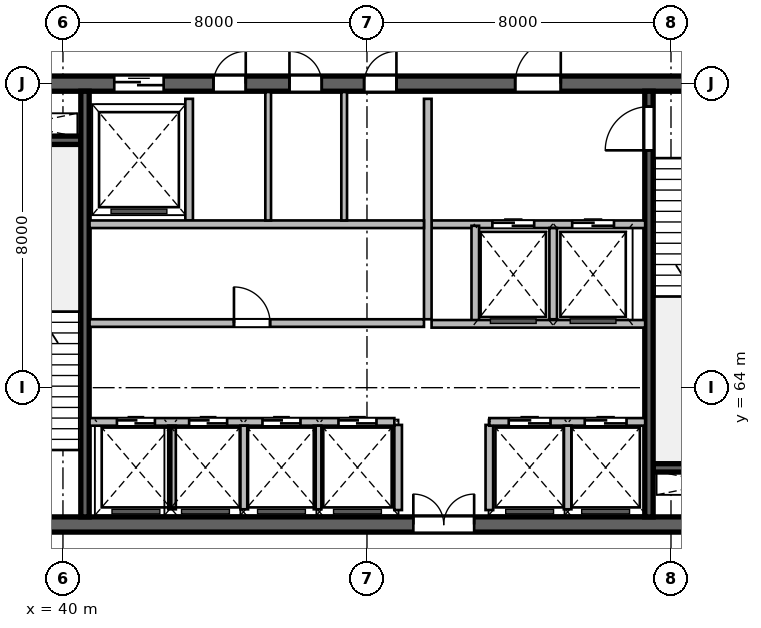
"""IFC4 building model, lengths in metres.
Left out: names, types, materials, properties, quantities, classifications, styles, units other than length and angle.
Written with IfcOpenShell. Run it as: python <this file> out.ifc"""

import sys

from ifc_helpers import new_model, si_unit, direction, frame, frame_2d, origin, place, context, subcontext, project, spatial, rectangle, extrude, source, transform, mapped, element, fill, save


model = new_model("IFC4")
c1 = context("Model", 3, precision=1e-05, world=origin(), true_north=direction((0.0, 1.0)))
c2 = subcontext(c1, "Body", "Model", "MODEL_VIEW")
j1 = project(units=[si_unit("LENGTHUNIT", "METRE"), si_unit("PLANEANGLEUNIT", "RADIAN")], contexts=[c1])
p1 = place(None, origin())
s1 = spatial("IfcSite", under=j1, at=p1, CompositionType="ELEMENT")
p2 = place(p1, origin())
s2 = spatial("IfcBuilding", under=s1, at=p2, CompositionType="ELEMENT")
p3 = place(p2, frame((0.0, 0.0, 303.0)))
s3 = spatial("IfcBuildingStorey", under=s2, at=p3, CompositionType="ELEMENT", Elevation=303.0)
m1 = source(origin(), c2, "Body", "SweptSolid", [
    extrude(rectangle(XDim=21.6, YDim=0.4, at=frame_2d((10.8, 0.0))), origin(), (0.0, 0.0, 1.0), 4.8),
])
p4 = place(p3, frame((37.2, 60.4, 0.0), z_axis=(0.0, 0.0, 1.0), x_axis=(1.0, 0.0, 0.0)))
e1 = element("IfcWall", 1, at=p4, inside=s3, PredefinedType="SHEAR", context=c2, shape_type="MappedRepresentation", body=[
    mapped(m1, transform((0.0, 0.0, 0.0), scale=1.0)),
])
p5 = place(p4, frame((1.1, 0.0, 0.0)))
e2 = element("IfcOpeningElement", 2, at=p5, cuts=e1, PredefinedType="OPENING", context=c2, shape_type="SweptSolid", body=[
    extrude(rectangle(XDim=1.15, YDim=2.15, at=frame_2d((0.575, 1.075))), frame((0.0, 0.21, 0.0), z_axis=(0.0, -1.0, 0.0), x_axis=(1.0, 0.0, 0.0)), (0.0, 0.0, 1.0), 0.42),
])
p6 = place(p4, frame((19.5, 0.0, 0.0)))
e3 = element("IfcOpeningElement", 3, at=p6, cuts=e1, PredefinedType="OPENING", context=c2, shape_type="SweptSolid", body=[
    extrude(rectangle(XDim=0.9, YDim=2.1, at=frame_2d((0.45, 1.05))), frame((0.0, 0.21, 0.0), z_axis=(0.0, -1.0, 0.0), x_axis=(1.0, 0.0, 0.0)), (0.0, 0.0, 1.0), 0.42),
])
p7 = place(p4, frame((12.02, 0.0, 0.0)))
e4 = element("IfcOpeningElement", 4, at=p7, cuts=e1, PredefinedType="OPENING", context=c2, shape_type="SweptSolid", body=[
    extrude(rectangle(XDim=1.6, YDim=2.15, at=frame_2d((0.8, 1.075))), frame((0.0, 0.21, 0.0), z_axis=(0.0, -1.0, 0.0), x_axis=(1.0, 0.0, 0.0)), (0.0, 0.0, 1.0), 0.42),
])
p8 = place(p3, frame((37.2, 72.0, 0.0), z_axis=(0.0, 0.0, 1.0), x_axis=(1.0, 0.0, 0.0)))
e5 = element("IfcWall", 5, at=p8, inside=s3, PredefinedType="SHEAR", context=c2, shape_type="MappedRepresentation", body=[
    mapped(m1, transform((0.0, 0.0, 0.0), scale=1.0)),
])
p9 = place(p8, frame((1.2, 0.0, 0.0)))
e6 = element("IfcOpeningElement", 6, at=p9, cuts=e5, PredefinedType="OPENING", context=c2, shape_type="SweptSolid", body=[
    extrude(rectangle(XDim=0.9, YDim=2.1, at=frame_2d((0.45, 1.05))), frame((0.0, 0.21, 0.0), z_axis=(0.0, -1.0, 0.0), x_axis=(1.0, 0.0, 0.0)), (0.0, 0.0, 1.0), 0.42),
])
p10 = place(p8, frame((14.7, 0.0, 0.0)))
e7 = element("IfcOpeningElement", 7, at=p10, cuts=e5, PredefinedType="OPENING", context=c2, shape_type="SweptSolid", body=[
    extrude(rectangle(XDim=1.2, YDim=2.15, at=frame_2d((0.6, 1.075))), frame((0.0, 0.21, 0.0), z_axis=(0.0, -1.0, 0.0), x_axis=(1.0, 0.0, 0.0)), (0.0, 0.0, 1.0), 0.42),
])
p11 = place(p8, frame((4.15, 0.0, 0.0)))
e8 = element("IfcOpeningElement", 8, at=p11, cuts=e5, PredefinedType="OPENING", context=c2, shape_type="SweptSolid", body=[
    extrude(rectangle(XDim=1.3, YDim=2.15, at=frame_2d((0.65, 1.075))), frame((0.0, 0.21, 0.0), z_axis=(0.0, -1.0, 0.0), x_axis=(1.0, 0.0, 0.0)), (0.0, 0.0, 1.0), 0.42),
])
p12 = place(p8, frame((6.76, 0.0, 0.0)))
e9 = element("IfcOpeningElement", 9, at=p12, cuts=e5, PredefinedType="OPENING", context=c2, shape_type="SweptSolid", body=[
    extrude(rectangle(XDim=0.85, YDim=2.1, at=frame_2d((0.425, 1.05))), frame((0.0, 0.21, 0.0), z_axis=(0.0, -1.0, 0.0), x_axis=(1.0, 0.0, 0.0)), (0.0, 0.0, 1.0), 0.42),
])
p13 = place(p8, frame((8.76, 0.0, 0.0)))
e10 = element("IfcOpeningElement", 10, at=p13, cuts=e5, PredefinedType="OPENING", context=c2, shape_type="SweptSolid", body=[
    extrude(rectangle(XDim=0.85, YDim=2.1, at=frame_2d((0.425, 1.05))), frame((0.0, 0.21, 0.0), z_axis=(0.0, -1.0, 0.0), x_axis=(1.0, 0.0, 0.0)), (0.0, 0.0, 1.0), 0.42),
])
p14 = place(p8, frame((10.725, 0.0, 0.0)))
e11 = element("IfcOpeningElement", 11, at=p14, cuts=e5, PredefinedType="OPENING", context=c2, shape_type="SweptSolid", body=[
    extrude(rectangle(XDim=0.85, YDim=2.1, at=frame_2d((0.425, 1.05))), frame((0.0, 0.21, 0.0), z_axis=(0.0, -1.0, 0.0), x_axis=(1.0, 0.0, 0.0)), (0.0, 0.0, 1.0), 0.42),
])
m2 = source(origin(), c2, "Body", "SweptSolid", [
    extrude(rectangle(XDim=3.27, YDim=0.22, at=frame_2d((1.635, 0.0))), origin(), (0.0, 0.0, 1.0), 4.8),
])
for number, where, z_axis, x_axis in (
    (12, (37.2, 70.51, 0.0), (0.0, 0.0, 1.0), (1.0, 0.0, 0.0)),
    (13, (55.53, 61.89, 0.0), (0.0, 0.0, 1.0), (1.0, 0.0, 0.0)),
):
    element("IfcWall", number, at=place(p3, frame(where, z_axis=z_axis, x_axis=x_axis)), inside=s3, PredefinedType="SHEAR", context=c2, shape_type="MappedRepresentation", body=[
        mapped(m2, transform((0.0, 0.0, 0.0), scale=1.0)),
    ])
m3 = source(origin(), c2, "Body", "SweptSolid", [
    extrude(rectangle(XDim=11.2, YDim=0.22, at=frame_2d((5.6, 0.0))), origin(), (0.0, 0.0, 1.0), 4.8),
])
p15 = place(p3, frame((40.58, 60.6, 0.0), z_axis=(0.0, 0.0, 1.0), x_axis=(0.0, 1.0, 0.0)))
e14 = element("IfcWall", 14, at=p15, inside=s3, PredefinedType="SHEAR", context=c2, shape_type="MappedRepresentation", body=[
    mapped(m3, transform((0.0, 0.0, 0.0), scale=1.0)),
])
p16 = place(p3, frame((55.42, 60.6, 0.0), z_axis=(0.0, 0.0, 1.0), x_axis=(0.0, 1.0, 0.0)))
e15 = element("IfcWall", 15, at=p16, inside=s3, PredefinedType="SHEAR", context=c2, shape_type="MappedRepresentation", body=[
    mapped(m3, transform((0.0, 0.0, 0.0), scale=1.0)),
])
p17 = place(p16, frame((9.645, 0.0, 0.0)))
e16 = element("IfcOpeningElement", 16, at=p17, cuts=e15, PredefinedType="OPENING", context=c2, shape_type="SweptSolid", body=[
    extrude(rectangle(XDim=1.15, YDim=2.15, at=frame_2d((0.575, 1.075))), frame((0.0, 0.12, 0.0), z_axis=(0.0, -1.0, 0.0), x_axis=(1.0, 0.0, 0.0)), (0.0, 0.0, 1.0), 0.24),
])
m4 = source(origin(), c2, "Body", "SweptSolid", [
    extrude(rectangle(XDim=2.24, YDim=0.2, at=frame_2d((1.12, 0.0))), origin(), (0.0, 0.0, 1.0), 4.54),
])
for number, where, z_axis, x_axis in (
    (17, (48.82, 60.78, 0.0), (0.0, 0.0, 1.0), (0.0, 1.0, 0.0)),
    (18, (51.22, 60.78, 0.0), (0.0, 0.0, 1.0), (0.0, 1.0, 0.0)),
):
    element("IfcWall", number, at=place(p3, frame(where, z_axis=z_axis, x_axis=x_axis)), inside=s3, PredefinedType="SOLIDWALL", context=c2, shape_type="MappedRepresentation", body=[
        mapped(m4, transform((0.0, 0.0, 0.0), scale=1.0)),
    ])
m5 = source(origin(), c2, "Body", "SweptSolid", [
    extrude(rectangle(XDim=5.62, YDim=0.2, at=frame_2d((2.81, 0.0))), origin(), (0.0, 0.0, 1.0), 4.54),
])
p18 = place(p3, frame((49.7, 68.3, 0.0), z_axis=(0.0, 0.0, 1.0), x_axis=(1.0, 0.0, 0.0)))
e19 = element("IfcWall", 19, at=p18, inside=s3, PredefinedType="SOLIDWALL", context=c2, shape_type="MappedRepresentation", body=[
    mapped(m5, transform((0.0, 0.0, 0.0), scale=1.0)),
])
p19 = place(p18, frame((1.6, 0.0, 0.0)))
e20 = element("IfcOpeningElement", 20, at=p19, cuts=e19, PredefinedType="OPENING", context=c2, shape_type="SweptSolid", body=[
    extrude(rectangle(XDim=1.1, YDim=2.15, at=frame_2d((0.55, 1.075))), frame((0.0, 0.11, 0.0), z_axis=(0.0, -1.0, 0.0), x_axis=(1.0, 0.0, 0.0)), (0.0, 0.0, 1.0), 0.22),
])
p20 = place(p18, frame((3.7, 0.0, 0.0)))
e21 = element("IfcOpeningElement", 21, at=p20, cuts=e19, PredefinedType="OPENING", context=c2, shape_type="SweptSolid", body=[
    extrude(rectangle(XDim=1.1, YDim=2.15, at=frame_2d((0.55, 1.075))), frame((0.0, 0.11, 0.0), z_axis=(0.0, -1.0, 0.0), x_axis=(1.0, 0.0, 0.0)), (0.0, 0.0, 1.0), 0.22),
])
m6 = source(origin(), c2, "Body", "SweptSolid", [
    extrude(rectangle(XDim=5.8, YDim=0.2, at=frame_2d((2.9, 0.0))), origin(), (0.0, 0.0, 1.0), 4.54),
])
p21 = place(p3, frame((49.6, 65.8, 0.0), z_axis=(0.0, 0.0, 1.0), x_axis=(0.0, 1.0, 0.0)))
e22 = element("IfcWall", 22, at=p21, inside=s3, PredefinedType="SOLIDWALL", context=c2, shape_type="MappedRepresentation", body=[
    mapped(m6, transform((0.0, 0.0, 0.0), scale=1.0)),
])
m7 = source(origin(), c2, "Body", "SweptSolid", [
    extrude(rectangle(XDim=2.58, YDim=0.2, at=frame_2d((1.29, 0.0))), origin(), (0.0, 0.0, 1.0), 4.54),
])
p22 = place(p3, frame((50.85, 65.68, 0.0), z_axis=(0.0, 0.0, 1.0), x_axis=(0.0, 1.0, 0.0)))
e23 = element("IfcWall", 23, at=p22, inside=s3, PredefinedType="SOLIDWALL", context=c2, shape_type="MappedRepresentation", body=[
    mapped(m7, transform((0.0, 0.0, 0.0), scale=1.0)),
])
m8 = source(origin(), c2, "Body", "SweptSolid", [
    extrude(rectangle(XDim=2.4, YDim=0.2, at=frame_2d((1.2, 0.0))), origin(), (0.0, 0.0, 1.0), 4.54),
])
p23 = place(p3, frame((52.9, 65.8, 0.0), z_axis=(0.0, 0.0, 1.0), x_axis=(0.0, 1.0, 0.0)))
e24 = element("IfcWall", 24, at=p23, inside=s3, PredefinedType="SOLIDWALL", context=c2, shape_type="MappedRepresentation", body=[
    mapped(m8, transform((0.0, 0.0, 0.0), scale=1.0)),
])
p24 = place(p3, frame((49.7, 65.68, 0.0), z_axis=(0.0, 0.0, 1.0), x_axis=(1.0, 0.0, 0.0)))
e25 = element("IfcWall", 25, at=p24, inside=s3, PredefinedType="SOLIDWALL", context=c2, shape_type="MappedRepresentation", body=[
    mapped(m5, transform((0.0, 0.0, 0.0), scale=1.0)),
])
m9 = source(origin(), c2, "Body", "SweptSolid", [
    extrude(rectangle(XDim=3.2, YDim=0.2, at=frame_2d((1.6, 0.0))), origin(), (0.0, 0.0, 1.0), 4.54),
])
p25 = place(p3, frame((43.32, 68.4, 0.0), z_axis=(0.0, 0.0, 1.0), x_axis=(0.0, 1.0, 0.0)))
e26 = element("IfcWall", 26, at=p25, inside=s3, PredefinedType="SOLIDWALL", context=c2, shape_type="MappedRepresentation", body=[
    mapped(m9, transform((0.0, 0.0, 0.0), scale=1.0)),
])
m10 = source(origin(), c2, "Body", "SweptSolid", [
    extrude(rectangle(XDim=8.8, YDim=0.2, at=frame_2d((4.4, 0.0))), origin(), (0.0, 0.0, 1.0), 4.54),
])
p26 = place(p3, frame((40.7, 68.3, 0.0), z_axis=(0.0, 0.0, 1.0), x_axis=(1.0, 0.0, 0.0)))
e27 = element("IfcWall", 27, at=p26, inside=s3, PredefinedType="SOLIDWALL", context=c2, shape_type="MappedRepresentation", body=[
    mapped(m10, transform((0.0, 0.0, 0.0), scale=1.0)),
])
m11 = source(origin(), c2, "Body", "SweptSolid", [
    extrude(rectangle(XDim=3.38, YDim=0.15, at=frame_2d((1.69, 0.0))), origin(), (0.0, 0.0, 1.0), 4.54),
])
for number, where, z_axis, x_axis in (
    (28, (45.4, 68.4, 0.0), (0.0, 0.0, 1.0), (0.0, 1.0, 0.0)),
    (29, (47.4, 68.4, 0.0), (0.0, 0.0, 1.0), (0.0, 1.0, 0.0)),
):
    element("IfcWall", number, at=place(p3, frame(where, z_axis=z_axis, x_axis=x_axis)), inside=s3, PredefinedType="PARTITIONING", context=c2, shape_type="MappedRepresentation", body=[
        mapped(m11, transform((0.0, 0.0, 0.0), scale=1.0)),
    ])
m12 = source(origin(), c2, "Body", "SweptSolid", [
    extrude(rectangle(XDim=8.02, YDim=0.2, at=frame_2d((4.01, 0.0))), origin(), (0.0, 0.0, 1.0), 4.54),
])
p27 = place(p3, frame((40.7, 63.1, 0.0), z_axis=(0.0, 0.0, 1.0), x_axis=(1.0, 0.0, 0.0)))
e30 = element("IfcWall", 30, at=p27, inside=s3, PredefinedType="SOLIDWALL", context=c2, shape_type="MappedRepresentation", body=[
    mapped(m12, transform((0.0, 0.0, 0.0), scale=1.0)),
])
p28 = place(p27, frame((0.72, 0.0, 0.0)))
e31 = element("IfcOpeningElement", 31, at=p28, cuts=e30, PredefinedType="OPENING", context=c2, shape_type="SweptSolid", body=[
    extrude(rectangle(XDim=1.0, YDim=2.15, at=frame_2d((0.5, 1.075))), frame((0.0, 0.11, 0.0), z_axis=(0.0, -1.0, 0.0), x_axis=(1.0, 0.0, 0.0)), (0.0, 0.0, 1.0), 0.22),
])
p29 = place(p27, frame((2.62, 0.0, 0.0)))
e32 = element("IfcOpeningElement", 32, at=p29, cuts=e30, PredefinedType="OPENING", context=c2, shape_type="SweptSolid", body=[
    extrude(rectangle(XDim=1.0, YDim=2.15, at=frame_2d((0.5, 1.075))), frame((0.0, 0.11, 0.0), z_axis=(0.0, -1.0, 0.0), x_axis=(1.0, 0.0, 0.0)), (0.0, 0.0, 1.0), 0.22),
])
p30 = place(p27, frame((4.55, 0.0, 0.0)))
e33 = element("IfcOpeningElement", 33, at=p30, cuts=e30, PredefinedType="OPENING", context=c2, shape_type="SweptSolid", body=[
    extrude(rectangle(XDim=1.0, YDim=2.15, at=frame_2d((0.5, 1.075))), frame((0.0, 0.11, 0.0), z_axis=(0.0, -1.0, 0.0), x_axis=(1.0, 0.0, 0.0)), (0.0, 0.0, 1.0), 0.22),
])
p31 = place(p27, frame((6.55, 0.0, 0.0)))
e34 = element("IfcOpeningElement", 34, at=p31, cuts=e30, PredefinedType="OPENING", context=c2, shape_type="SweptSolid", body=[
    extrude(rectangle(XDim=1.0, YDim=2.15, at=frame_2d((0.5, 1.075))), frame((0.0, 0.11, 0.0), z_axis=(0.0, -1.0, 0.0), x_axis=(1.0, 0.0, 0.0)), (0.0, 0.0, 1.0), 0.22),
])
m13 = source(origin(), c2, "Body", "SweptSolid", [
    extrude(rectangle(XDim=4.1, YDim=0.2, at=frame_2d((2.05, 0.0))), origin(), (0.0, 0.0, 1.0), 4.54),
])
p32 = place(p3, frame((51.22, 63.1, 0.0), z_axis=(0.0, 0.0, 1.0), x_axis=(1.0, 0.0, 0.0)))
e35 = element("IfcWall", 35, at=p32, inside=s3, PredefinedType="SOLIDWALL", context=c2, shape_type="MappedRepresentation", body=[
    mapped(m13, transform((0.0, 0.0, 0.0), scale=1.0)),
])
p33 = place(p32, frame((0.51, 0.0, 0.0)))
e36 = element("IfcOpeningElement", 36, at=p33, cuts=e35, PredefinedType="OPENING", context=c2, shape_type="SweptSolid", body=[
    extrude(rectangle(XDim=1.1, YDim=2.15, at=frame_2d((0.55, 1.075))), frame((0.0, 0.11, 0.0), z_axis=(0.0, -1.0, 0.0), x_axis=(1.0, 0.0, 0.0)), (0.0, 0.0, 1.0), 0.22),
])
p34 = place(p32, frame((2.51, 0.0, 0.0)))
e37 = element("IfcOpeningElement", 37, at=p34, cuts=e35, PredefinedType="OPENING", context=c2, shape_type="SweptSolid", body=[
    extrude(rectangle(XDim=1.1, YDim=2.15, at=frame_2d((0.55, 1.075))), frame((0.0, 0.11, 0.0), z_axis=(0.0, -1.0, 0.0), x_axis=(1.0, 0.0, 0.0)), (0.0, 0.0, 1.0), 0.22),
])
m14 = source(origin(), c2, "Body", "SweptSolid", [
    extrude(rectangle(XDim=2.2, YDim=0.2, at=frame_2d((1.1, 0.0))), origin(), (0.0, 0.0, 1.0), 4.54),
])
for number, where, z_axis, x_axis in (
    (38, (42.87, 60.8, 0.0), (0.0, 0.0, 1.0), (0.0, 1.0, 0.0)),
    (39, (44.77, 60.8, 0.0), (0.0, 0.0, 1.0), (0.0, 1.0, 0.0)),
    (40, (46.7, 60.8, 0.0), (0.0, 0.0, 1.0), (0.0, 1.0, 0.0)),
    (41, (53.28, 60.8, 0.0), (0.0, 0.0, 1.0), (0.0, 1.0, 0.0)),
):
    element("IfcWall", number, at=place(p3, frame(where, z_axis=z_axis, x_axis=x_axis)), inside=s3, PredefinedType="SOLIDWALL", context=c2, shape_type="MappedRepresentation", body=[
        mapped(m14, transform((0.0, 0.0, 0.0), scale=1.0)),
    ])
p35 = place(p3, frame((40.7, 65.7, 0.0), z_axis=(0.0, 0.0, 1.0), x_axis=(1.0, 0.0, 0.0)))
e42 = element("IfcWall", 42, at=p35, inside=s3, PredefinedType="SOLIDWALL", context=c2, shape_type="MappedRepresentation", body=[
    mapped(m10, transform((0.0, 0.0, 0.0), scale=1.0)),
])
p36 = place(p35, frame((3.8, 0.0, 0.0)))
e43 = element("IfcOpeningElement", 43, at=p36, cuts=e42, PredefinedType="OPENING", context=c2, shape_type="SweptSolid", body=[
    extrude(rectangle(XDim=0.95, YDim=2.15, at=frame_2d((0.475, 1.075))), frame((0.0, 0.11, 0.0), z_axis=(0.0, -1.0, 0.0), x_axis=(1.0, 0.0, 0.0)), (0.0, 0.0, 1.0), 0.22),
])
m15 = source(origin(), c2, "Body", "SweptSolid", [
    extrude(rectangle(XDim=1.15, YDim=2.15, at=frame_2d((0.575, 1.075))), frame((0.0, 0.025, 0.0), z_axis=(0.0, -1.0, 0.0), x_axis=(1.0, 0.0, 0.0)), (0.0, 0.0, 1.0), 0.05),
])
p37 = place(p17, origin())
e44 = element("IfcDoor", 44, at=p37, inside=s3, OperationType="SINGLE_SWING_LEFT", PredefinedType="DOOR", context=c2, shape_type="MappedRepresentation", body=[
    mapped(m15, transform((0.0, 0.0, 0.0), scale=1.0)),
])
fill(e16, e44)
m16 = source(origin(), c2, "Body", "SweptSolid", [
    extrude(rectangle(XDim=1.6, YDim=2.15, at=frame_2d((0.8, 1.075))), frame((0.0, 0.025, 0.0), z_axis=(0.0, -1.0, 0.0), x_axis=(1.0, 0.0, 0.0)), (0.0, 0.0, 1.0), 0.05),
])
p38 = place(p7, origin())
e45 = element("IfcDoor", 45, at=p38, inside=s3, OperationType="DOUBLE_DOOR_SINGLE_SWING", PredefinedType="DOOR", context=c2, shape_type="MappedRepresentation", body=[
    mapped(m16, transform((0.0, 0.0, 0.0), scale=1.0)),
])
fill(e4, e45)
m17 = source(origin(), c2, "Body", "SweptSolid", [
    extrude(rectangle(XDim=1.2, YDim=2.15, at=frame_2d((0.6, 1.075))), frame((0.0, 0.025, 0.0), z_axis=(0.0, -1.0, 0.0), x_axis=(1.0, 0.0, 0.0)), (0.0, 0.0, 1.0), 0.05),
])
p39 = place(p10, origin())
e46 = element("IfcDoor", 46, at=p39, inside=s3, OperationType="SINGLE_SWING_RIGHT", PredefinedType="DOOR", context=c2, shape_type="MappedRepresentation", body=[
    mapped(m17, transform((0.0, 0.0, 0.0), scale=1.0)),
])
fill(e7, e46)
m18 = source(origin(), c2, "Body", "SweptSolid", [
    extrude(rectangle(XDim=1.1, YDim=2.15, at=frame_2d((0.55, 1.075))), frame((0.0, 0.025, 0.0), z_axis=(0.0, -1.0, 0.0), x_axis=(1.0, 0.0, 0.0)), (0.0, 0.0, 1.0), 0.05),
])
p40 = place(p19, origin())
e47 = element("IfcDoor", 47, at=p40, inside=s3, OperationType="DOUBLE_DOOR_SLIDING", PredefinedType="DOOR", context=c2, shape_type="MappedRepresentation", body=[
    mapped(m18, transform((0.0, 0.0, 0.0), scale=1.0)),
])
fill(e20, e47)
p41 = place(p20, origin())
e48 = element("IfcDoor", 48, at=p41, inside=s3, OperationType="DOUBLE_DOOR_SLIDING", PredefinedType="DOOR", context=c2, shape_type="MappedRepresentation", body=[
    mapped(m18, transform((0.0, 0.0, 0.0), scale=1.0)),
])
fill(e21, e48)
m19 = source(origin(), c2, "Body", "SweptSolid", [
    extrude(rectangle(XDim=1.3, YDim=2.15, at=frame_2d((0.65, 1.075))), frame((0.0, 0.025, 0.0), z_axis=(0.0, -1.0, 0.0), x_axis=(1.0, 0.0, 0.0)), (0.0, 0.0, 1.0), 0.05),
])
p42 = place(p11, origin())
e49 = element("IfcDoor", 49, at=p42, inside=s3, OperationType="DOUBLE_DOOR_SLIDING", PredefinedType="DOOR", context=c2, shape_type="MappedRepresentation", body=[
    mapped(m19, transform((0.0, 0.0, 0.0), scale=1.0)),
])
fill(e8, e49)
m20 = source(origin(), c2, "Body", "SweptSolid", [
    extrude(rectangle(XDim=0.85, YDim=2.1, at=frame_2d((0.425, 1.05))), frame((0.0, 0.025, 0.0), z_axis=(0.0, -1.0, 0.0), x_axis=(1.0, 0.0, 0.0)), (0.0, 0.0, 1.0), 0.05),
])
p43 = place(p12, origin())
e50 = element("IfcDoor", 50, at=p43, inside=s3, OperationType="SINGLE_SWING_RIGHT", PredefinedType="DOOR", context=c2, shape_type="MappedRepresentation", body=[
    mapped(m20, transform((0.0, 0.0, 0.0), scale=1.0)),
])
fill(e9, e50)
p44 = place(p13, origin())
e51 = element("IfcDoor", 51, at=p44, inside=s3, OperationType="SINGLE_SWING_LEFT", PredefinedType="DOOR", context=c2, shape_type="MappedRepresentation", body=[
    mapped(m20, transform((0.0, 0.0, 0.0), scale=1.0)),
])
fill(e10, e51)
p45 = place(p14, origin())
e52 = element("IfcDoor", 52, at=p45, inside=s3, OperationType="SINGLE_SWING_RIGHT", PredefinedType="DOOR", context=c2, shape_type="MappedRepresentation", body=[
    mapped(m20, transform((0.0, 0.0, 0.0), scale=1.0)),
])
fill(e11, e52)
m21 = source(origin(), c2, "Body", "SweptSolid", [
    extrude(rectangle(XDim=1.0, YDim=2.15, at=frame_2d((0.5, 1.075))), frame((0.0, 0.025, 0.0), z_axis=(0.0, -1.0, 0.0), x_axis=(1.0, 0.0, 0.0)), (0.0, 0.0, 1.0), 0.05),
])
p46 = place(p28, origin())
e53 = element("IfcDoor", 53, at=p46, inside=s3, OperationType="DOUBLE_DOOR_SLIDING", PredefinedType="DOOR", context=c2, shape_type="MappedRepresentation", body=[
    mapped(m21, transform((0.0, 0.0, 0.0), scale=1.0)),
])
fill(e31, e53)
p47 = place(p29, origin())
e54 = element("IfcDoor", 54, at=p47, inside=s3, OperationType="DOUBLE_DOOR_SLIDING", PredefinedType="DOOR", context=c2, shape_type="MappedRepresentation", body=[
    mapped(m21, transform((0.0, 0.0, 0.0), scale=1.0)),
])
fill(e32, e54)
p48 = place(p30, origin())
e55 = element("IfcDoor", 55, at=p48, inside=s3, OperationType="DOUBLE_DOOR_SLIDING", PredefinedType="DOOR", context=c2, shape_type="MappedRepresentation", body=[
    mapped(m21, transform((0.0, 0.0, 0.0), scale=1.0)),
])
fill(e33, e55)
p49 = place(p31, origin())
e56 = element("IfcDoor", 56, at=p49, inside=s3, OperationType="DOUBLE_DOOR_SLIDING", PredefinedType="DOOR", context=c2, shape_type="MappedRepresentation", body=[
    mapped(m21, transform((0.0, 0.0, 0.0), scale=1.0)),
])
fill(e34, e56)
m22 = source(origin(), c2, "Body", "SweptSolid", [
    extrude(rectangle(XDim=1.1, YDim=2.15, at=frame_2d((0.55, 1.075))), frame((0.0, 0.025, 0.0), z_axis=(0.0, -1.0, 0.0), x_axis=(1.0, 0.0, 0.0)), (0.0, 0.0, 1.0), 0.05),
])
p50 = place(p33, origin())
e57 = element("IfcDoor", 57, at=p50, inside=s3, OperationType="DOUBLE_DOOR_SLIDING", PredefinedType="DOOR", context=c2, shape_type="MappedRepresentation", body=[
    mapped(m22, transform((0.0, 0.0, 0.0), scale=1.0)),
])
fill(e36, e57)
p51 = place(p34, origin())
e58 = element("IfcDoor", 58, at=p51, inside=s3, OperationType="DOUBLE_DOOR_SLIDING", PredefinedType="DOOR", context=c2, shape_type="MappedRepresentation", body=[
    mapped(m22, transform((0.0, 0.0, 0.0), scale=1.0)),
])
fill(e37, e58)
m23 = source(origin(), c2, "Body", "SweptSolid", [
    extrude(rectangle(XDim=0.95, YDim=2.15, at=frame_2d((0.475, 1.075))), frame((0.0, 0.025, 0.0), z_axis=(0.0, -1.0, 0.0), x_axis=(1.0, 0.0, 0.0)), (0.0, 0.0, 1.0), 0.05),
])
p52 = place(p36, origin())
e59 = element("IfcDoor", 59, at=p52, inside=s3, OperationType="SINGLE_SWING_LEFT", PredefinedType="DOOR", context=c2, shape_type="MappedRepresentation", body=[
    mapped(m23, transform((0.0, 0.0, 0.0), scale=1.0)),
])
fill(e43, e59)
save(model, sys.argv[1])
